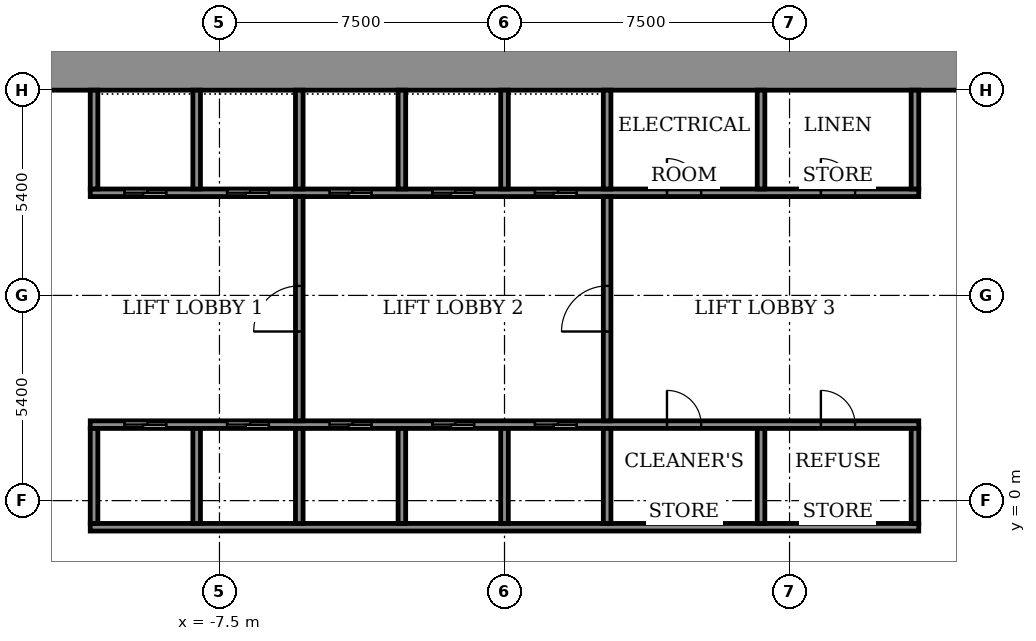
"""IFC4 building model, lengths in metres.
Left out: names, types, materials, properties, quantities, classifications, styles, units other than length and angle.
Written with IfcOpenShell. Run it as: python <this file> out.ifc"""

import sys

from ifc_helpers import new_model, si_unit, direction, frame, frame_2d, origin, place, context, subcontext, project, spatial, rectangle, extrude, element, fill, save


model = new_model("IFC4")
c1 = context("Model", 3, precision=1e-05, world=origin(), true_north=direction((0.0, 1.0)))
c2 = subcontext(c1, "Body", "Model", "MODEL_VIEW")
j1 = project(units=[si_unit("LENGTHUNIT", "METRE"), si_unit("PLANEANGLEUNIT", "RADIAN")], contexts=[c1])
p1 = place(None, origin())
s1 = spatial("IfcSite", under=j1, at=p1, CompositionType="ELEMENT")
p2 = place(p1, origin())
s2 = spatial("IfcBuilding", under=s1, at=p2, CompositionType="ELEMENT")
p3 = place(p2, frame((0.0, 0.0, 56.7)))
s3 = spatial("IfcBuildingStorey", under=s2, at=p3, CompositionType="ELEMENT", Elevation=56.7)
p4 = place(p3, frame((-14.9, 11.35, 0.0), z_axis=(0.0, 0.0, 1.0), x_axis=(1.0, 0.0, 0.0)))
e1 = element("IfcWall", 1, at=p4, inside=s3, PredefinedType="SHEAR", context=c2, shape_type="SweptSolid", body=[
    extrude(rectangle(XDim=29.8, YDim=1.1, at=frame_2d((14.9, 0.0))), origin(), (0.0, 0.0, 1.0), 3.6),
])
p5 = place(p3, frame((-10.9, -0.7, 0.0), z_axis=(0.0, 0.0, 1.0), x_axis=(1.0, 0.0, 0.0)))
e2 = element("IfcWall", 2, at=p5, inside=s3, PredefinedType="SHEAR", context=c2, shape_type="SweptSolid", body=[
    extrude(rectangle(XDim=21.8, YDim=0.2, at=frame_2d((10.9, 0.0))), origin(), (0.0, 0.0, 1.0), 3.05),
])
p6 = place(p3, frame((-10.9, 2.0, 0.0), z_axis=(0.0, 0.0, 1.0), x_axis=(1.0, 0.0, 0.0)))
e3 = element("IfcWall", 3, at=p6, inside=s3, PredefinedType="SHEAR", context=c2, shape_type="SweptSolid", body=[
    extrude(rectangle(XDim=21.8, YDim=0.2, at=frame_2d((10.9, 0.0))), origin(), (0.0, 0.0, 1.0), 3.05),
])
p7 = place(p6, frame((0.9, 0.0, 0.0)))
e4 = element("IfcOpeningElement", 4, at=p7, cuts=e3, PredefinedType="OPENING", context=c2, shape_type="SweptSolid", body=[
    extrude(rectangle(XDim=1.1, YDim=2.1, at=frame_2d((0.55, 1.05))), frame((0.0, 0.11, 0.0), z_axis=(0.0, -1.0, 0.0), x_axis=(1.0, 0.0, 0.0)), (0.0, 0.0, 1.0), 0.22),
])
p8 = place(p6, frame((3.6, 0.0, 0.0)))
e5 = element("IfcOpeningElement", 5, at=p8, cuts=e3, PredefinedType="OPENING", context=c2, shape_type="SweptSolid", body=[
    extrude(rectangle(XDim=1.1, YDim=2.1, at=frame_2d((0.55, 1.05))), frame((0.0, 0.11, 0.0), z_axis=(0.0, -1.0, 0.0), x_axis=(1.0, 0.0, 0.0)), (0.0, 0.0, 1.0), 0.22),
])
p9 = place(p6, frame((6.3, 0.0, 0.0)))
e6 = element("IfcOpeningElement", 6, at=p9, cuts=e3, PredefinedType="OPENING", context=c2, shape_type="SweptSolid", body=[
    extrude(rectangle(XDim=1.1, YDim=2.1, at=frame_2d((0.55, 1.05))), frame((0.0, 0.11, 0.0), z_axis=(0.0, -1.0, 0.0), x_axis=(1.0, 0.0, 0.0)), (0.0, 0.0, 1.0), 0.22),
])
p10 = place(p6, frame((9.0, 0.0, 0.0)))
e7 = element("IfcOpeningElement", 7, at=p10, cuts=e3, PredefinedType="OPENING", context=c2, shape_type="SweptSolid", body=[
    extrude(rectangle(XDim=1.1, YDim=2.1, at=frame_2d((0.55, 1.05))), frame((0.0, 0.11, 0.0), z_axis=(0.0, -1.0, 0.0), x_axis=(1.0, 0.0, 0.0)), (0.0, 0.0, 1.0), 0.22),
])
p11 = place(p6, frame((11.7, 0.0, 0.0)))
e8 = element("IfcOpeningElement", 8, at=p11, cuts=e3, PredefinedType="OPENING", context=c2, shape_type="SweptSolid", body=[
    extrude(rectangle(XDim=1.1, YDim=2.1, at=frame_2d((0.55, 1.05))), frame((0.0, 0.11, 0.0), z_axis=(0.0, -1.0, 0.0), x_axis=(1.0, 0.0, 0.0)), (0.0, 0.0, 1.0), 0.22),
])
p12 = place(p6, frame((15.175, 0.0, 0.0)))
e9 = element("IfcOpeningElement", 9, at=p12, cuts=e3, PredefinedType="OPENING", context=c2, shape_type="SweptSolid", body=[
    extrude(rectangle(XDim=0.9, YDim=2.1, at=frame_2d((0.45, 1.05))), frame((0.0, 0.11, 0.0), z_axis=(0.0, -1.0, 0.0), x_axis=(1.0, 0.0, 0.0)), (0.0, 0.0, 1.0), 0.22),
])
p13 = place(p6, frame((19.225, 0.0, 0.0)))
e10 = element("IfcOpeningElement", 10, at=p13, cuts=e3, PredefinedType="OPENING", context=c2, shape_type="SweptSolid", body=[
    extrude(rectangle(XDim=0.9, YDim=2.1, at=frame_2d((0.45, 1.05))), frame((0.0, 0.11, 0.0), z_axis=(0.0, -1.0, 0.0), x_axis=(1.0, 0.0, 0.0)), (0.0, 0.0, 1.0), 0.22),
])
p14 = place(p3, frame((-10.9, 8.1, 0.0), z_axis=(0.0, 0.0, 1.0), x_axis=(1.0, 0.0, 0.0)))
e11 = element("IfcWall", 11, at=p14, inside=s3, PredefinedType="SHEAR", context=c2, shape_type="SweptSolid", body=[
    extrude(rectangle(XDim=21.8, YDim=0.2, at=frame_2d((10.9, 0.0))), origin(), (0.0, 0.0, 1.0), 3.05),
])
p15 = place(p14, frame((0.9, 0.0, 0.0)))
e12 = element("IfcOpeningElement", 12, at=p15, cuts=e11, PredefinedType="OPENING", context=c2, shape_type="SweptSolid", body=[
    extrude(rectangle(XDim=1.1, YDim=2.1, at=frame_2d((0.55, 1.05))), frame((0.0, 0.11, 0.0), z_axis=(0.0, -1.0, 0.0), x_axis=(1.0, 0.0, 0.0)), (0.0, 0.0, 1.0), 0.22),
])
p16 = place(p14, frame((3.6, 0.0, 0.0)))
e13 = element("IfcOpeningElement", 13, at=p16, cuts=e11, PredefinedType="OPENING", context=c2, shape_type="SweptSolid", body=[
    extrude(rectangle(XDim=1.1, YDim=2.1, at=frame_2d((0.55, 1.05))), frame((0.0, 0.11, 0.0), z_axis=(0.0, -1.0, 0.0), x_axis=(1.0, 0.0, 0.0)), (0.0, 0.0, 1.0), 0.22),
])
p17 = place(p14, frame((6.3, 0.0, 0.0)))
e14 = element("IfcOpeningElement", 14, at=p17, cuts=e11, PredefinedType="OPENING", context=c2, shape_type="SweptSolid", body=[
    extrude(rectangle(XDim=1.1, YDim=2.1, at=frame_2d((0.55, 1.05))), frame((0.0, 0.11, 0.0), z_axis=(0.0, -1.0, 0.0), x_axis=(1.0, 0.0, 0.0)), (0.0, 0.0, 1.0), 0.22),
])
p18 = place(p14, frame((9.0, 0.0, 0.0)))
e15 = element("IfcOpeningElement", 15, at=p18, cuts=e11, PredefinedType="OPENING", context=c2, shape_type="SweptSolid", body=[
    extrude(rectangle(XDim=1.1, YDim=2.1, at=frame_2d((0.55, 1.05))), frame((0.0, 0.11, 0.0), z_axis=(0.0, -1.0, 0.0), x_axis=(1.0, 0.0, 0.0)), (0.0, 0.0, 1.0), 0.22),
])
p19 = place(p14, frame((11.7, 0.0, 0.0)))
e16 = element("IfcOpeningElement", 16, at=p19, cuts=e11, PredefinedType="OPENING", context=c2, shape_type="SweptSolid", body=[
    extrude(rectangle(XDim=1.1, YDim=2.1, at=frame_2d((0.55, 1.05))), frame((0.0, 0.11, 0.0), z_axis=(0.0, -1.0, 0.0), x_axis=(1.0, 0.0, 0.0)), (0.0, 0.0, 1.0), 0.22),
])
p20 = place(p14, frame((15.175, 0.0, 0.0)))
e17 = element("IfcOpeningElement", 17, at=p20, cuts=e11, PredefinedType="OPENING", context=c2, shape_type="SweptSolid", body=[
    extrude(rectangle(XDim=0.9, YDim=2.1, at=frame_2d((0.45, 1.05))), frame((0.0, 0.11, 0.0), z_axis=(0.0, -1.0, 0.0), x_axis=(1.0, 0.0, 0.0)), (0.0, 0.0, 1.0), 0.22),
])
p21 = place(p14, frame((19.225, 0.0, 0.0)))
e18 = element("IfcOpeningElement", 18, at=p21, cuts=e11, PredefinedType="OPENING", context=c2, shape_type="SweptSolid", body=[
    extrude(rectangle(XDim=0.9, YDim=2.1, at=frame_2d((0.45, 1.05))), frame((0.0, 0.11, 0.0), z_axis=(0.0, -1.0, 0.0), x_axis=(1.0, 0.0, 0.0)), (0.0, 0.0, 1.0), 0.22),
])
for number, where, z_axis, x_axis in (
    (19, (-10.8, -0.6, 0.0), (0.0, 0.0, 1.0), (0.0, 1.0, 0.0)),
    (20, (-8.1, -0.6, 0.0), (0.0, 0.0, 1.0), (0.0, 1.0, 0.0)),
    (21, (-5.4, -0.6, 0.0), (0.0, 0.0, 1.0), (0.0, 1.0, 0.0)),
    (22, (-2.7, -0.6, 0.0), (0.0, 0.0, 1.0), (0.0, 1.0, 0.0)),
    (23, (0.0, -0.6, 0.0), (0.0, 0.0, 1.0), (0.0, 1.0, 0.0)),
    (24, (2.7, -0.6, 0.0), (0.0, 0.0, 1.0), (0.0, 1.0, 0.0)),
):
    element("IfcWall", number, at=place(p3, frame(where, z_axis=z_axis, x_axis=x_axis)), inside=s3, PredefinedType="SHEAR", context=c2, shape_type="SweptSolid", body=[
        extrude(rectangle(XDim=2.5, YDim=0.2, at=frame_2d((1.25, 0.0))), origin(), (0.0, 0.0, 1.0), 3.05),
    ])
for number, where, z_axis, x_axis in (
    (25, (6.75, -0.6, 0.0), (0.0, 0.0, 1.0), (0.0, 1.0, 0.0)),
    (26, (10.8, -0.6, 0.0), (0.0, 0.0, 1.0), (0.0, 1.0, 0.0)),
):
    element("IfcWall", number, at=place(p3, frame(where, z_axis=z_axis, x_axis=x_axis)), inside=s3, PredefinedType="STANDARD", context=c2, shape_type="SweptSolid", body=[
        extrude(rectangle(XDim=2.5, YDim=0.2, at=frame_2d((1.25, 0.0))), origin(), (0.0, 0.0, 1.0), 3.05),
    ])
for number, where, z_axis, x_axis in (
    (27, (-10.8, 8.2, 0.0), (0.0, 0.0, 1.0), (0.0, 1.0, 0.0)),
    (28, (-8.1, 8.2, 0.0), (0.0, 0.0, 1.0), (0.0, 1.0, 0.0)),
    (29, (-5.4, 8.2, 0.0), (0.0, 0.0, 1.0), (0.0, 1.0, 0.0)),
    (30, (-2.7, 8.2, 0.0), (0.0, 0.0, 1.0), (0.0, 1.0, 0.0)),
    (31, (0.0, 8.2, 0.0), (0.0, 0.0, 1.0), (0.0, 1.0, 0.0)),
    (32, (2.7, 8.2, 0.0), (0.0, 0.0, 1.0), (0.0, 1.0, 0.0)),
):
    element("IfcWall", number, at=place(p3, frame(where, z_axis=z_axis, x_axis=x_axis)), inside=s3, PredefinedType="SHEAR", context=c2, shape_type="SweptSolid", body=[
        extrude(rectangle(XDim=2.6, YDim=0.2, at=frame_2d((1.3, 0.0))), origin(), (0.0, 0.0, 1.0), 3.05),
    ])
for number, where, z_axis, x_axis in (
    (33, (6.75, 8.2, 0.0), (0.0, 0.0, 1.0), (0.0, 1.0, 0.0)),
    (34, (10.8, 8.2, 0.0), (0.0, 0.0, 1.0), (0.0, 1.0, 0.0)),
):
    element("IfcWall", number, at=place(p3, frame(where, z_axis=z_axis, x_axis=x_axis)), inside=s3, PredefinedType="STANDARD", context=c2, shape_type="SweptSolid", body=[
        extrude(rectangle(XDim=2.6, YDim=0.2, at=frame_2d((1.3, 0.0))), origin(), (0.0, 0.0, 1.0), 3.05),
    ])
p22 = place(p3, frame((-5.4, 2.1, 0.0), z_axis=(0.0, 0.0, 1.0), x_axis=(0.0, 1.0, 0.0)))
e35 = element("IfcWall", 35, at=p22, inside=s3, PredefinedType="STANDARD", context=c2, shape_type="SweptSolid", body=[
    extrude(rectangle(XDim=5.9, YDim=0.2, at=frame_2d((2.95, 0.0))), origin(), (0.0, 0.0, 1.0), 3.05),
])
p23 = place(p22, frame((2.35, 0.0, 0.0)))
e36 = element("IfcOpeningElement", 36, at=p23, cuts=e35, PredefinedType="OPENING", context=c2, shape_type="SweptSolid", body=[
    extrude(rectangle(XDim=1.2, YDim=2.1, at=frame_2d((0.6, 1.05))), frame((0.0, 0.11, 0.0), z_axis=(0.0, -1.0, 0.0), x_axis=(1.0, 0.0, 0.0)), (0.0, 0.0, 1.0), 0.22),
])
p24 = place(p3, frame((2.7, 2.1, 0.0), z_axis=(0.0, 0.0, 1.0), x_axis=(0.0, 1.0, 0.0)))
e37 = element("IfcWall", 37, at=p24, inside=s3, PredefinedType="STANDARD", context=c2, shape_type="SweptSolid", body=[
    extrude(rectangle(XDim=5.9, YDim=0.2, at=frame_2d((2.95, 0.0))), origin(), (0.0, 0.0, 1.0), 3.05),
])
p25 = place(p24, frame((2.35, 0.0, 0.0)))
e38 = element("IfcOpeningElement", 38, at=p25, cuts=e37, PredefinedType="OPENING", context=c2, shape_type="SweptSolid", body=[
    extrude(rectangle(XDim=1.2, YDim=2.1, at=frame_2d((0.6, 1.05))), frame((0.0, 0.11, 0.0), z_axis=(0.0, -1.0, 0.0), x_axis=(1.0, 0.0, 0.0)), (0.0, 0.0, 1.0), 0.22),
])
p26 = place(p7, origin())
e39 = element("IfcDoor", 39, at=p26, inside=s3, OperationType="SLIDING_TO_LEFT", PredefinedType="DOOR", context=c2, shape_type="SweptSolid", body=[
    extrude(rectangle(XDim=1.1, YDim=2.1, at=frame_2d((0.55, 1.05))), frame((0.0, 0.025, 0.0), z_axis=(0.0, -1.0, 0.0), x_axis=(1.0, 0.0, 0.0)), (0.0, 0.0, 1.0), 0.05),
])
fill(e4, e39)
p27 = place(p8, origin())
e40 = element("IfcDoor", 40, at=p27, inside=s3, OperationType="SLIDING_TO_LEFT", PredefinedType="DOOR", context=c2, shape_type="SweptSolid", body=[
    extrude(rectangle(XDim=1.1, YDim=2.1, at=frame_2d((0.55, 1.05))), frame((0.0, 0.025, 0.0), z_axis=(0.0, -1.0, 0.0), x_axis=(1.0, 0.0, 0.0)), (0.0, 0.0, 1.0), 0.05),
])
fill(e5, e40)
p28 = place(p9, origin())
e41 = element("IfcDoor", 41, at=p28, inside=s3, OperationType="SLIDING_TO_LEFT", PredefinedType="DOOR", context=c2, shape_type="SweptSolid", body=[
    extrude(rectangle(XDim=1.1, YDim=2.1, at=frame_2d((0.55, 1.05))), frame((0.0, 0.025, 0.0), z_axis=(0.0, -1.0, 0.0), x_axis=(1.0, 0.0, 0.0)), (0.0, 0.0, 1.0), 0.05),
])
fill(e6, e41)
p29 = place(p10, origin())
e42 = element("IfcDoor", 42, at=p29, inside=s3, OperationType="SLIDING_TO_LEFT", PredefinedType="DOOR", context=c2, shape_type="SweptSolid", body=[
    extrude(rectangle(XDim=1.1, YDim=2.1, at=frame_2d((0.55, 1.05))), frame((0.0, 0.025, 0.0), z_axis=(0.0, -1.0, 0.0), x_axis=(1.0, 0.0, 0.0)), (0.0, 0.0, 1.0), 0.05),
])
fill(e7, e42)
p30 = place(p11, origin())
e43 = element("IfcDoor", 43, at=p30, inside=s3, OperationType="SLIDING_TO_LEFT", PredefinedType="DOOR", context=c2, shape_type="SweptSolid", body=[
    extrude(rectangle(XDim=1.1, YDim=2.1, at=frame_2d((0.55, 1.05))), frame((0.0, 0.025, 0.0), z_axis=(0.0, -1.0, 0.0), x_axis=(1.0, 0.0, 0.0)), (0.0, 0.0, 1.0), 0.05),
])
fill(e8, e43)
p31 = place(p15, origin())
e44 = element("IfcDoor", 44, at=p31, inside=s3, OperationType="SLIDING_TO_LEFT", PredefinedType="DOOR", context=c2, shape_type="SweptSolid", body=[
    extrude(rectangle(XDim=1.1, YDim=2.1, at=frame_2d((0.55, 1.05))), frame((0.0, 0.025, 0.0), z_axis=(0.0, -1.0, 0.0), x_axis=(1.0, 0.0, 0.0)), (0.0, 0.0, 1.0), 0.05),
])
fill(e12, e44)
p32 = place(p16, origin())
e45 = element("IfcDoor", 45, at=p32, inside=s3, OperationType="SLIDING_TO_LEFT", PredefinedType="DOOR", context=c2, shape_type="SweptSolid", body=[
    extrude(rectangle(XDim=1.1, YDim=2.1, at=frame_2d((0.55, 1.05))), frame((0.0, 0.025, 0.0), z_axis=(0.0, -1.0, 0.0), x_axis=(1.0, 0.0, 0.0)), (0.0, 0.0, 1.0), 0.05),
])
fill(e13, e45)
p33 = place(p17, origin())
e46 = element("IfcDoor", 46, at=p33, inside=s3, OperationType="SLIDING_TO_LEFT", PredefinedType="DOOR", context=c2, shape_type="SweptSolid", body=[
    extrude(rectangle(XDim=1.1, YDim=2.1, at=frame_2d((0.55, 1.05))), frame((0.0, 0.025, 0.0), z_axis=(0.0, -1.0, 0.0), x_axis=(1.0, 0.0, 0.0)), (0.0, 0.0, 1.0), 0.05),
])
fill(e14, e46)
p34 = place(p18, origin())
e47 = element("IfcDoor", 47, at=p34, inside=s3, OperationType="SLIDING_TO_LEFT", PredefinedType="DOOR", context=c2, shape_type="SweptSolid", body=[
    extrude(rectangle(XDim=1.1, YDim=2.1, at=frame_2d((0.55, 1.05))), frame((0.0, 0.025, 0.0), z_axis=(0.0, -1.0, 0.0), x_axis=(1.0, 0.0, 0.0)), (0.0, 0.0, 1.0), 0.05),
])
fill(e15, e47)
p35 = place(p19, origin())
e48 = element("IfcDoor", 48, at=p35, inside=s3, OperationType="SLIDING_TO_LEFT", PredefinedType="DOOR", context=c2, shape_type="SweptSolid", body=[
    extrude(rectangle(XDim=1.1, YDim=2.1, at=frame_2d((0.55, 1.05))), frame((0.0, 0.025, 0.0), z_axis=(0.0, -1.0, 0.0), x_axis=(1.0, 0.0, 0.0)), (0.0, 0.0, 1.0), 0.05),
])
fill(e16, e48)
p36 = place(p12, origin())
e49 = element("IfcDoor", 49, at=p36, inside=s3, OperationType="SINGLE_SWING_RIGHT", PredefinedType="DOOR", context=c2, shape_type="SweptSolid", body=[
    extrude(rectangle(XDim=0.9, YDim=2.1, at=frame_2d((0.45, 1.05))), frame((0.0, 0.025, 0.0), z_axis=(0.0, -1.0, 0.0), x_axis=(1.0, 0.0, 0.0)), (0.0, 0.0, 1.0), 0.05),
])
fill(e9, e49)
p37 = place(p13, origin())
e50 = element("IfcDoor", 50, at=p37, inside=s3, OperationType="SINGLE_SWING_RIGHT", PredefinedType="DOOR", context=c2, shape_type="SweptSolid", body=[
    extrude(rectangle(XDim=0.9, YDim=2.1, at=frame_2d((0.45, 1.05))), frame((0.0, 0.025, 0.0), z_axis=(0.0, -1.0, 0.0), x_axis=(1.0, 0.0, 0.0)), (0.0, 0.0, 1.0), 0.05),
])
fill(e10, e50)
p38 = place(p20, origin())
e51 = element("IfcDoor", 51, at=p38, inside=s3, OperationType="SINGLE_SWING_LEFT", PredefinedType="DOOR", context=c2, shape_type="SweptSolid", body=[
    extrude(rectangle(XDim=0.9, YDim=2.1, at=frame_2d((0.45, 1.05))), frame((0.0, 0.025, 0.0), z_axis=(0.0, -1.0, 0.0), x_axis=(1.0, 0.0, 0.0)), (0.0, 0.0, 1.0), 0.05),
])
fill(e17, e51)
p39 = place(p21, origin())
e52 = element("IfcDoor", 52, at=p39, inside=s3, OperationType="SINGLE_SWING_RIGHT", PredefinedType="DOOR", context=c2, shape_type="SweptSolid", body=[
    extrude(rectangle(XDim=0.9, YDim=2.1, at=frame_2d((0.45, 1.05))), frame((0.0, 0.025, 0.0), z_axis=(0.0, -1.0, 0.0), x_axis=(1.0, 0.0, 0.0)), (0.0, 0.0, 1.0), 0.05),
])
fill(e18, e52)
p40 = place(p23, origin())
e53 = element("IfcDoor", 53, at=p40, inside=s3, OperationType="SINGLE_SWING_LEFT", PredefinedType="DOOR", context=c2, shape_type="SweptSolid", body=[
    extrude(rectangle(XDim=1.2, YDim=2.1, at=frame_2d((0.6, 1.05))), frame((0.0, 0.025, 0.0), z_axis=(0.0, -1.0, 0.0), x_axis=(1.0, 0.0, 0.0)), (0.0, 0.0, 1.0), 0.05),
])
fill(e36, e53)
p41 = place(p25, origin())
e54 = element("IfcDoor", 54, at=p41, inside=s3, OperationType="SINGLE_SWING_LEFT", PredefinedType="DOOR", context=c2, shape_type="SweptSolid", body=[
    extrude(rectangle(XDim=1.2, YDim=2.1, at=frame_2d((0.6, 1.05))), frame((0.0, 0.025, 0.0), z_axis=(0.0, -1.0, 0.0), x_axis=(1.0, 0.0, 0.0)), (0.0, 0.0, 1.0), 0.05),
])
fill(e38, e54)
save(model, sys.argv[1])
